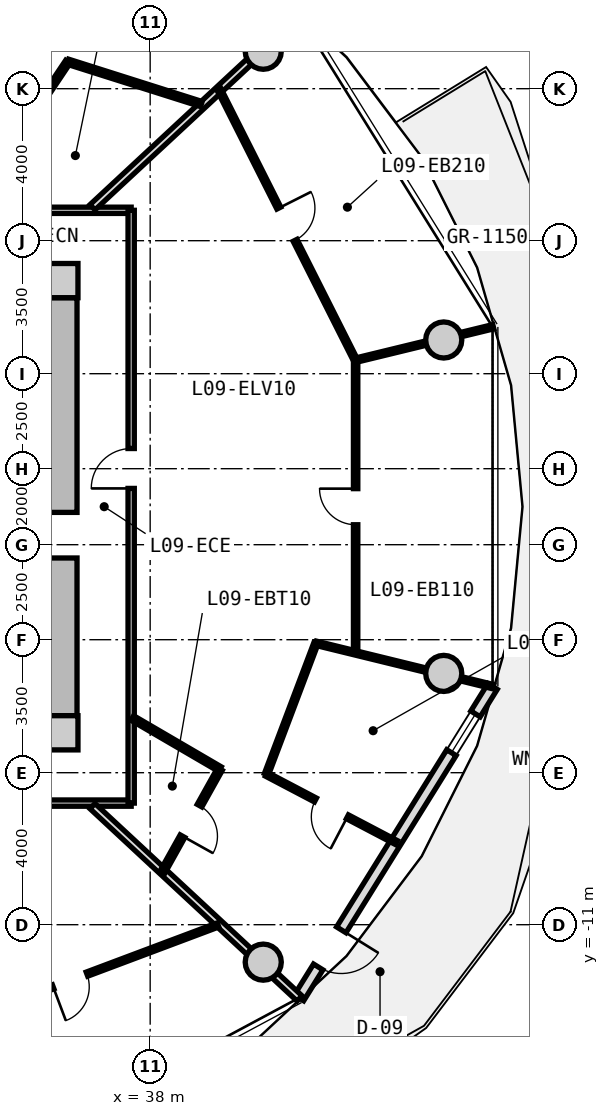
"""IFC4 building model, lengths in metres.
Left out: names, types, materials, properties, quantities, classifications, styles, units other than length and angle.
Written with IfcOpenShell. Run it as: python <this file> out.ifc"""

import sys

from ifc_helpers import new_model, si_unit, direction, frame, frame_2d, origin, origin_2d, place, context, subcontext, project, spatial, rectangle, circle, extrude, source, transform, mapped, element, fill, save


model = new_model("IFC4")
c1 = context("Model", 3, precision=1e-05, world=origin(), true_north=direction((0.0, 1.0)))
c2 = subcontext(c1, "Body", "Model", "MODEL_VIEW")
j1 = project(units=[si_unit("LENGTHUNIT", "METRE"), si_unit("PLANEANGLEUNIT", "RADIAN")], contexts=[c1])
p1 = place(None, origin())
s1 = spatial("IfcSite", under=j1, at=p1, CompositionType="ELEMENT")
p2 = place(p1, origin())
s2 = spatial("IfcBuilding", under=s1, at=p2, CompositionType="ELEMENT")
p3 = place(p2, frame((0.0, 0.0, 33.8)))
s3 = spatial("IfcBuildingStorey", under=s2, at=p3, CompositionType="ELEMENT", Elevation=33.8)
m1 = source(origin(), c2, "Body", "SweptSolid", [
    extrude(rectangle(XDim=0.9, YDim=0.9, at=origin_2d()), origin(), (0.0, 0.0, 1.0), 3.05),
])
for number, where, z_axis, x_axis in (
    (1, (35.65, -5.95, 0.0), (0.0, 0.0, 1.0), (1.0, 0.0, 0.0)),
    (2, (35.65, 5.95, 0.0), (0.0, 0.0, 1.0), (1.0, 0.0, 0.0)),
):
    element("IfcColumn", number, at=place(p3, frame(where, z_axis=z_axis, x_axis=x_axis)), inside=s3, PredefinedType="COLUMN", context=c2, shape_type="MappedRepresentation", body=[
        mapped(m1, transform((0.0, 0.0, 0.0), x_axis=(1.0, 0.0, 0.0), y_axis=(0.0, 1.0, 0.0), z_axis=(0.0, 0.0, 1.0), scale=1.0)),
    ])
m2 = source(origin(), c2, "Body", "SweptSolid", [
    extrude(rectangle(XDim=11.0, YDim=0.85, at=frame_2d((5.5, 0.0))), origin(), (0.0, 0.0, 1.0), 2.79),
])
p4 = place(p3, frame((35.65, 5.5, 0.0), z_axis=(0.0, 0.0, 1.0), x_axis=(0.0, -1.0, 0.0)))
e3 = element("IfcWall", 3, at=p4, inside=s3, PredefinedType="SHEAR", context=c2, shape_type="MappedRepresentation", body=[
    mapped(m2, transform((0.0, 0.0, 0.0), x_axis=(1.0, 0.0, 0.0), y_axis=(0.0, 1.0, 0.0), z_axis=(0.0, 0.0, 1.0), scale=1.0)),
])
p5 = place(p4, frame((5.65, 0.0, 0.0)))
e4 = element("IfcOpeningElement", 4, at=p5, cuts=e3, PredefinedType="OPENING", context=c2, shape_type="SweptSolid", body=[
    extrude(rectangle(XDim=1.2, YDim=2.15, at=frame_2d((0.6, 1.075))), frame((0.0, 0.435, 0.0), z_axis=(0.0, -1.0, 0.0), x_axis=(1.0, 0.0, 0.0)), (0.0, 0.0, 1.0), 0.87),
])
m3 = source(origin(), c2, "Body", "SweptSolid", [
    extrude(circle(Radius=0.475, at=origin_2d()), origin(), (0.0, 0.0, 1.0), 3.05),
])
for number, where, z_axis, x_axis in (
    (5, (45.725, 4.387, 0.0), (0.0, 0.0, 1.0), (1.0, 0.0, 0.0)),
    (6, (40.975, 11.985, 0.0), (0.0, 0.0, 1.0), (1.0, 0.0, 0.0)),
    (7, (40.975, -11.985, 0.0), (0.0, 0.0, 1.0), (1.0, 0.0, 0.0)),
    (8, (45.725, -4.387, 0.0), (0.0, 0.0, 1.0), (1.0, 0.0, 0.0)),
):
    element("IfcColumn", number, at=place(p3, frame(where, z_axis=z_axis, x_axis=x_axis)), inside=s3, PredefinedType="COLUMN", context=c2, shape_type="MappedRepresentation", body=[
        mapped(m3, transform((0.0, 0.0, 0.0), x_axis=(1.0, 0.0, 0.0), y_axis=(0.0, 1.0, 0.0), z_axis=(0.0, 0.0, 1.0), scale=1.0)),
    ])
m4 = source(origin(), c2, "Body", "SweptSolid", [
    extrude(rectangle(XDim=9.649, YDim=0.29, at=frame_2d((4.824, 0.0))), origin(), (0.0, 0.0, 1.0), 2.79),
])
p6 = place(p3, frame((47.01, -4.731, 0.0), z_axis=(0.0, 0.0, 1.0), x_axis=(-0.527909458386, -0.849300655684, 0.0)))
e9 = element("IfcWall", 9, at=p6, inside=s3, PredefinedType="SOLIDWALL", context=c2, shape_type="MappedRepresentation", body=[
    mapped(m4, transform((0.0, 0.0, 0.0), x_axis=(1.0, 0.0, 0.0), y_axis=(0.0, 1.0, 0.0), z_axis=(0.0, 0.0, 1.0), scale=1.0)),
])
p7 = place(p6, frame((7.54, 0.0, 0.0)))
e10 = element("IfcOpeningElement", 10, at=p7, cuts=e9, PredefinedType="OPENING", context=c2, shape_type="SweptSolid", body=[
    extrude(rectangle(XDim=1.15, YDim=2.25, at=frame_2d((0.575, 1.125))), frame((0.0, 0.155, 0.0), z_axis=(0.0, -1.0, 0.0), x_axis=(1.0, 0.0, 0.0)), (0.0, 0.0, 1.0), 0.31),
])
p8 = place(p6, frame((0.85, 0.0, 0.85)))
e11 = element("IfcOpeningElement", 11, at=p8, cuts=e9, PredefinedType="OPENING", context=c2, shape_type="SweptSolid", body=[
    extrude(rectangle(XDim=1.2, YDim=1.5, at=frame_2d((0.6, 0.75))), frame((0.0, 0.155, 0.0), z_axis=(0.0, -1.0, 0.0), x_axis=(1.0, 0.0, 0.0)), (0.0, 0.0, 1.0), 0.31),
])
m5 = source(origin(), c2, "Body", "SweptSolid", [
    extrude(rectangle(XDim=19.0, YDim=0.165, at=frame_2d((9.5, 0.0))), origin(), (0.0, 0.0, 1.0), 2.775),
])
p9 = place(p3, frame((18.5, 7.8, 0.0), z_axis=(0.0, 0.0, 1.0), x_axis=(1.0, 0.0, 0.0)))
e12 = element("IfcWall", 12, at=p9, inside=s3, PredefinedType="PARTITIONING", context=c2, shape_type="MappedRepresentation", body=[
    mapped(m5, transform((0.0, 0.0, 0.0), x_axis=(1.0, 0.0, 0.0), y_axis=(0.0, 1.0, 0.0), z_axis=(0.0, 0.0, 1.0), scale=1.0)),
])
p10 = place(p9, frame((10.523, 0.0, 0.0)))
e13 = element("IfcOpeningElement", 13, at=p10, cuts=e12, PredefinedType="OPENING", context=c2, shape_type="SweptSolid", body=[
    extrude(rectangle(XDim=0.92, YDim=2.1, at=frame_2d((0.46, 1.05))), frame((0.0, 0.093, 0.0), z_axis=(0.0, -1.0, 0.0), x_axis=(1.0, 0.0, 0.0)), (0.0, 0.0, 1.0), 0.185),
])
p11 = place(p9, frame((8.226, 0.0, 0.0)))
e14 = element("IfcOpeningElement", 14, at=p11, cuts=e12, PredefinedType="OPENING", context=c2, shape_type="SweptSolid", body=[
    extrude(rectangle(XDim=0.92, YDim=2.1, at=frame_2d((0.46, 1.05))), frame((0.0, 0.093, 0.0), z_axis=(0.0, -1.0, 0.0), x_axis=(1.0, 0.0, 0.0)), (0.0, 0.0, 1.0), 0.185),
])
p12 = place(p9, frame((3.506, 0.0, 0.0)))
e15 = element("IfcOpeningElement", 15, at=p12, cuts=e12, PredefinedType="OPENING", context=c2, shape_type="SweptSolid", body=[
    extrude(rectangle(XDim=1.25, YDim=2.2, at=frame_2d((0.625, 1.1))), frame((0.0, 0.093, 0.0), z_axis=(0.0, -1.0, 0.0), x_axis=(1.0, 0.0, 0.0)), (0.0, 0.0, 1.0), 0.185),
])
p13 = place(p9, frame((12.706, 0.0, 0.0)))
e16 = element("IfcOpeningElement", 16, at=p13, cuts=e12, PredefinedType="OPENING", context=c2, shape_type="SweptSolid", body=[
    extrude(rectangle(XDim=1.05, YDim=2.15, at=frame_2d((0.525, 1.075))), frame((0.0, 0.093, 0.0), z_axis=(0.0, -1.0, 0.0), x_axis=(1.0, 0.0, 0.0)), (0.0, 0.0, 1.0), 0.185),
])
p14 = place(p3, frame((37.5, -7.8, 0.0), z_axis=(0.0, 0.0, 1.0), x_axis=(-1.0, 0.0, 0.0)))
e17 = element("IfcWall", 17, at=p14, inside=s3, PredefinedType="PARTITIONING", context=c2, shape_type="MappedRepresentation", body=[
    mapped(m5, transform((0.0, 0.0, 0.0), x_axis=(1.0, 0.0, 0.0), y_axis=(0.0, 1.0, 0.0), z_axis=(0.0, 0.0, 1.0), scale=1.0)),
])
p15 = place(p14, frame((7.336, 0.0, 0.0)))
e18 = element("IfcOpeningElement", 18, at=p15, cuts=e17, PredefinedType="OPENING", context=c2, shape_type="SweptSolid", body=[
    extrude(rectangle(XDim=1.05, YDim=2.15, at=frame_2d((0.525, 1.075))), frame((0.0, 0.093, 0.0), z_axis=(0.0, -1.0, 0.0), x_axis=(1.0, 0.0, 0.0)), (0.0, 0.0, 1.0), 0.185),
])
m6 = source(origin(), c2, "Body", "SweptSolid", [
    extrude(rectangle(XDim=15.6, YDim=0.165, at=frame_2d((7.8, 0.0))), origin(), (0.0, 0.0, 1.0), 2.775),
])
p16 = place(p3, frame((37.5, 7.8, 0.0), z_axis=(0.0, 0.0, 1.0), x_axis=(0.0, -1.0, 0.0)))
e19 = element("IfcWall", 19, at=p16, inside=s3, PredefinedType="PARTITIONING", context=c2, shape_type="MappedRepresentation", body=[
    mapped(m6, transform((0.0, 0.0, 0.0), x_axis=(1.0, 0.0, 0.0), y_axis=(0.0, 1.0, 0.0), z_axis=(0.0, 0.0, 1.0), scale=1.0)),
])
p17 = place(p16, frame((6.269, 0.0, 0.0)))
e20 = element("IfcOpeningElement", 20, at=p17, cuts=e19, PredefinedType="OPENING", context=c2, shape_type="SweptSolid", body=[
    extrude(rectangle(XDim=1.05, YDim=2.15, at=frame_2d((0.525, 1.075))), frame((0.0, 0.093, 0.0), z_axis=(0.0, -1.0, 0.0), x_axis=(1.0, 0.0, 0.0)), (0.0, 0.0, 1.0), 0.185),
])
m7 = source(origin(), c2, "Body", "SweptSolid", [
    extrude(rectangle(XDim=7.435, YDim=0.19, at=frame_2d((3.717, 0.0))), origin(), (0.0, 0.0, 1.0), 2.225),
])
p18 = place(p3, frame((36.483, -7.88, 0.0), z_axis=(0.0, 0.0, 1.0), x_axis=(0.732651956848, -0.680603489652, 0.0)))
e21 = element("IfcWall", 21, at=p18, inside=s3, PredefinedType="PARTITIONING", context=c2, shape_type="MappedRepresentation", body=[
    mapped(m7, transform((0.0, 0.0, 0.0), x_axis=(1.0, 0.0, 0.0), y_axis=(0.0, 1.0, 0.0), z_axis=(0.0, 0.0, 1.0), scale=1.0)),
])
m8 = source(origin(), c2, "Body", "SweptSolid", [
    extrude(rectangle(XDim=8.32, YDim=0.115, at=frame_2d((4.16, 0.0))), origin(), (0.0, 0.0, 1.0), 2.775),
])
p19 = place(p3, frame((31.997, -13.93, 0.0), z_axis=(0.0, 0.0, 1.0), x_axis=(0.936180763098, 0.351518959382, 0.0)))
e22 = element("IfcWall", 22, at=p19, inside=s3, PredefinedType="PARTITIONING", context=c2, shape_type="MappedRepresentation", body=[
    mapped(m8, transform((0.0, 0.0, 0.0), x_axis=(1.0, 0.0, 0.0), y_axis=(0.0, 1.0, 0.0), z_axis=(0.0, 0.0, 1.0), scale=1.0)),
])
p20 = place(p19, frame((3.685, 0.0, 0.0)))
e23 = element("IfcOpeningElement", 23, at=p20, cuts=e22, PredefinedType="OPENING", context=c2, shape_type="SweptSolid", body=[
    extrude(rectangle(XDim=0.95, YDim=2.1, at=frame_2d((0.475, 1.05))), frame((0.0, 0.067, 0.0), z_axis=(0.0, -1.0, 0.0), x_axis=(1.0, 0.0, 0.0)), (0.0, 0.0, 1.0), 0.135),
])
p21 = place(p3, frame((36.483, 7.88, 0.0), z_axis=(0.0, 0.0, 1.0), x_axis=(0.732651956848, 0.680603489652, 0.0)))
e24 = element("IfcWall", 24, at=p21, inside=s3, PredefinedType="PARTITIONING", context=c2, shape_type="MappedRepresentation", body=[
    mapped(m7, transform((0.0, 0.0, 0.0), x_axis=(1.0, 0.0, 0.0), y_axis=(0.0, 1.0, 0.0), z_axis=(0.0, 0.0, 1.0), scale=1.0)),
])
m9 = source(origin(), c2, "Body", "SweptSolid", [
    extrude(rectangle(XDim=7.709, YDim=0.115, at=frame_2d((3.855, 0.0))), origin(), (0.0, 0.0, 1.0), 2.775),
])
p22 = place(p3, frame((43.406, -3.855, 0.0), z_axis=(0.0, 0.0, 1.0), x_axis=(0.0, 1.0, 0.0)))
e25 = element("IfcWall", 25, at=p22, inside=s3, PredefinedType="PARTITIONING", context=c2, shape_type="MappedRepresentation", body=[
    mapped(m9, transform((0.0, 0.0, 0.0), x_axis=(1.0, 0.0, 0.0), y_axis=(0.0, 1.0, 0.0), z_axis=(0.0, 0.0, 1.0), scale=1.0)),
])
p23 = place(p22, frame((3.38, 0.0, 0.0)))
e26 = element("IfcOpeningElement", 26, at=p23, cuts=e25, PredefinedType="OPENING", context=c2, shape_type="SweptSolid", body=[
    extrude(rectangle(XDim=0.95, YDim=2.1, at=frame_2d((0.475, 1.05))), frame((0.0, 0.067, 0.0), z_axis=(0.0, -1.0, 0.0), x_axis=(1.0, 0.0, 0.0)), (0.0, 0.0, 1.0), 0.135),
])
m10 = source(origin(), c2, "Body", "SweptSolid", [
    extrude(rectangle(XDim=4.803, YDim=0.115, at=frame_2d((2.401, 0.0))), origin(), (0.0, 0.0, 1.0), 2.225),
])
p24 = place(p3, frame((42.364, -3.594, 0.0), z_axis=(0.0, 0.0, 1.0), x_axis=(0.97129155908, -0.237892217736, 0.0)))
e27 = element("IfcWall", 27, at=p24, inside=s3, PredefinedType="PARTITIONING", context=c2, shape_type="MappedRepresentation", body=[
    mapped(m10, transform((0.0, 0.0, 0.0), x_axis=(1.0, 0.0, 0.0), y_axis=(0.0, 1.0, 0.0), z_axis=(0.0, 0.0, 1.0), scale=1.0)),
])
m11 = source(origin(), c2, "Body", "SweptSolid", [
    extrude(rectangle(XDim=8.018, YDim=0.115, at=frame_2d((4.009, 0.0))), origin(), (0.0, 0.0, 1.0), 2.775),
])
p25 = place(p3, frame((43.404, 3.854, 0.0), z_axis=(0.0, 0.0, 1.0), x_axis=(-0.450134355233, 0.89296084026, 0.0)))
e28 = element("IfcWall", 28, at=p25, inside=s3, PredefinedType="PARTITIONING", context=c2, shape_type="MappedRepresentation", body=[
    mapped(m11, transform((0.0, 0.0, 0.0), x_axis=(1.0, 0.0, 0.0), y_axis=(0.0, 1.0, 0.0), z_axis=(0.0, 0.0, 1.0), scale=1.0)),
])
p26 = place(p25, frame((3.534, 0.0, 0.0)))
e29 = element("IfcOpeningElement", 29, at=p26, cuts=e28, PredefinedType="OPENING", context=c2, shape_type="SweptSolid", body=[
    extrude(rectangle(XDim=0.95, YDim=2.1, at=frame_2d((0.475, 1.05))), frame((0.0, 0.067, 0.0), z_axis=(0.0, -1.0, 0.0), x_axis=(1.0, 0.0, 0.0)), (0.0, 0.0, 1.0), 0.135),
])
m12 = source(origin(), c2, "Body", "SweptSolid", [
    extrude(rectangle(XDim=3.73, YDim=0.115, at=frame_2d((1.865, 0.0))), origin(), (0.0, 0.0, 1.0), 2.225),
])
p27 = place(p3, frame((43.404, 3.854, 0.0), z_axis=(0.0, 0.0, 1.0), x_axis=(0.971644038568, 0.236448434791, 0.0)))
e30 = element("IfcWall", 30, at=p27, inside=s3, PredefinedType="PARTITIONING", context=c2, shape_type="MappedRepresentation", body=[
    mapped(m12, transform((0.0, 0.0, 0.0), x_axis=(1.0, 0.0, 0.0), y_axis=(0.0, 1.0, 0.0), z_axis=(0.0, 0.0, 1.0), scale=1.0)),
])
m13 = source(origin(), c2, "Body", "SweptSolid", [
    extrude(rectangle(XDim=2.669, YDim=0.14, at=frame_2d((1.335, 0.0))), origin(), (0.0, 0.0, 1.0), 2.775),
])
p28 = place(p3, frame((37.53, -5.561, 0.0), z_axis=(0.0, 0.0, 1.0), x_axis=(0.86369928178, -0.50400749067, 0.0)))
e31 = element("IfcWall", 31, at=p28, inside=s3, PredefinedType="PARTITIONING", context=c2, shape_type="MappedRepresentation", body=[
    mapped(m13, transform((0.0, 0.0, 0.0), x_axis=(1.0, 0.0, 0.0), y_axis=(0.0, 1.0, 0.0), z_axis=(0.0, 0.0, 1.0), scale=1.0)),
])
m14 = source(origin(), c2, "Body", "SweptSolid", [
    extrude(rectangle(XDim=3.121, YDim=0.14, at=frame_2d((1.561, 0.0))), origin(), (0.0, 0.0, 1.0), 2.775),
])
p29 = place(p3, frame((39.836, -6.906, 0.0), z_axis=(0.0, 0.0, 1.0), x_axis=(-0.487302357327, -0.873233309342, 0.0)))
e32 = element("IfcWall", 32, at=p29, inside=s3, PredefinedType="PARTITIONING", context=c2, shape_type="MappedRepresentation", body=[
    mapped(m14, transform((0.0, 0.0, 0.0), x_axis=(1.0, 0.0, 0.0), y_axis=(0.0, 1.0, 0.0), z_axis=(0.0, 0.0, 1.0), scale=1.0)),
])
p30 = place(p29, frame((1.101, 0.0, 0.0)))
e33 = element("IfcOpeningElement", 33, at=p30, cuts=e32, PredefinedType="OPENING", context=c2, shape_type="SweptSolid", body=[
    extrude(rectangle(XDim=0.92, YDim=2.1, at=frame_2d((0.46, 1.05))), frame((0.0, 0.08, 0.0), z_axis=(0.0, -1.0, 0.0), x_axis=(1.0, 0.0, 0.0)), (0.0, 0.0, 1.0), 0.16),
])
m15 = source(origin(), c2, "Body", "SweptSolid", [
    extrude(rectangle(XDim=3.864, YDim=0.115, at=frame_2d((1.932, 0.0))), origin(), (0.0, 0.0, 1.0), 2.775),
])
p31 = place(p3, frame((41.06, -7.041, 0.0), z_axis=(0.0, 0.0, 1.0), x_axis=(0.885194959803, -0.465220252289, 0.0)))
e34 = element("IfcWall", 34, at=p31, inside=s3, PredefinedType="PARTITIONING", context=c2, shape_type="MappedRepresentation", body=[
    mapped(m15, transform((0.0, 0.0, 0.0), x_axis=(1.0, 0.0, 0.0), y_axis=(0.0, 1.0, 0.0), z_axis=(0.0, 0.0, 1.0), scale=1.0)),
])
p32 = place(p31, frame((1.457, 0.0, 0.0)))
e35 = element("IfcOpeningElement", 35, at=p32, cuts=e34, PredefinedType="OPENING", context=c2, shape_type="SweptSolid", body=[
    extrude(rectangle(XDim=0.95, YDim=2.1, at=frame_2d((0.475, 1.05))), frame((0.0, 0.067, 0.0), z_axis=(0.0, -1.0, 0.0), x_axis=(1.0, 0.0, 0.0)), (0.0, 0.0, 1.0), 0.135),
])
m16 = source(origin(), c2, "Body", "SweptSolid", [
    extrude(rectangle(XDim=3.685, YDim=0.115, at=frame_2d((1.843, 0.0))), origin(), (0.0, 0.0, 1.0), 2.775),
])
p33 = place(p3, frame((41.06, -7.041, 0.0), z_axis=(0.0, 0.0, 1.0), x_axis=(0.353503632997, 0.935433151785, 0.0)))
e36 = element("IfcWall", 36, at=p33, inside=s3, PredefinedType="PARTITIONING", context=c2, shape_type="MappedRepresentation", body=[
    mapped(m16, transform((0.0, 0.0, 0.0), x_axis=(1.0, 0.0, 0.0), y_axis=(0.0, 1.0, 0.0), z_axis=(0.0, 0.0, 1.0), scale=1.0)),
])
m17 = source(origin(), c2, "Body", "SweptSolid", [
    extrude(rectangle(XDim=4.668, YDim=0.14, at=frame_2d((2.334, 0.0))), origin(), (0.0, 0.0, 1.0), 2.775),
])
p34 = place(p3, frame((33.24, 7.83, 0.0), z_axis=(0.0, 0.0, 1.0), x_axis=(0.55615986029, 0.83107533341, 0.0)))
e37 = element("IfcWall", 37, at=p34, inside=s3, PredefinedType="PARTITIONING", context=c2, shape_type="MappedRepresentation", body=[
    mapped(m17, transform((0.0, 0.0, 0.0), x_axis=(1.0, 0.0, 0.0), y_axis=(0.0, 1.0, 0.0), z_axis=(0.0, 0.0, 1.0), scale=1.0)),
])
p35 = place(p34, frame((1.874, 0.0, 0.0)))
e38 = element("IfcOpeningElement", 38, at=p35, cuts=e37, PredefinedType="OPENING", context=c2, shape_type="SweptSolid", body=[
    extrude(rectangle(XDim=0.92, YDim=2.1, at=frame_2d((0.46, 1.05))), frame((0.0, 0.08, 0.0), z_axis=(0.0, -1.0, 0.0), x_axis=(1.0, 0.0, 0.0)), (0.0, 0.0, 1.0), 0.16),
])
m18 = source(origin(), c2, "Body", "SweptSolid", [
    extrude(rectangle(XDim=3.684, YDim=0.14, at=frame_2d((1.842, 0.0))), origin(), (0.0, 0.0, 1.0), 2.775),
])
p36 = place(p3, frame((35.836, 11.709, 0.0), z_axis=(0.0, 0.0, 1.0), x_axis=(0.953245538614, -0.302196861518, 0.0)))
e39 = element("IfcWall", 39, at=p36, inside=s3, PredefinedType="PARTITIONING", context=c2, shape_type="MappedRepresentation", body=[
    mapped(m18, transform((0.0, 0.0, 0.0), x_axis=(1.0, 0.0, 0.0), y_axis=(0.0, 1.0, 0.0), z_axis=(0.0, 0.0, 1.0), scale=1.0)),
])
m19 = source(origin(), c2, "Body", "SweptSolid", [
    extrude(rectangle(XDim=1.15, YDim=2.25, at=frame_2d((0.575, 1.125))), frame((0.0, 0.025, 0.0), z_axis=(0.0, -1.0, 0.0), x_axis=(1.0, 0.0, 0.0)), (0.0, 0.0, 1.0), 0.05),
])
p37 = place(p7, origin())
e40 = element("IfcDoor", 40, at=p37, inside=s3, OperationType="SINGLE_SWING_LEFT", PredefinedType="DOOR", context=c2, shape_type="MappedRepresentation", body=[
    mapped(m19, transform((0.0, 0.0, 0.0), x_axis=(1.0, 0.0, 0.0), y_axis=(0.0, 1.0, 0.0), z_axis=(0.0, 0.0, 1.0), scale=1.0)),
])
fill(e10, e40)
m20 = source(origin(), c2, "Body", "SweptSolid", [
    extrude(rectangle(XDim=1.2, YDim=1.5, at=frame_2d((0.6, 0.75))), frame((0.0, 0.03, 0.0), z_axis=(0.0, -1.0, 0.0), x_axis=(1.0, 0.0, 0.0)), (0.0, 0.0, 1.0), 0.06),
])
p38 = place(p8, origin())
e41 = element("IfcWindow", 41, at=p38, inside=s3, PartitioningType="SINGLE_PANEL", PredefinedType="WINDOW", context=c2, shape_type="MappedRepresentation", body=[
    mapped(m20, transform((0.0, 0.0, 0.0), x_axis=(1.0, 0.0, 0.0), y_axis=(0.0, 1.0, 0.0), z_axis=(0.0, 0.0, 1.0), scale=1.0)),
])
fill(e11, e41)
m21 = source(origin(), c2, "Body", "SweptSolid", [
    extrude(rectangle(XDim=1.2, YDim=2.15, at=frame_2d((0.6, 1.075))), frame((0.0, 0.025, 0.0), z_axis=(0.0, -1.0, 0.0), x_axis=(1.0, 0.0, 0.0)), (0.0, 0.0, 1.0), 0.05),
])
p39 = place(p5, frame((1.2, 0.0, 0.0), z_axis=(0.0, 0.0, 1.0), x_axis=(-1.0, 0.0, 0.0)))
e42 = element("IfcDoor", 42, at=p39, inside=s3, OperationType="SINGLE_SWING_RIGHT", PredefinedType="DOOR", context=c2, shape_type="MappedRepresentation", body=[
    mapped(m21, transform((0.0, 0.0, 0.0), x_axis=(1.0, 0.0, 0.0), y_axis=(0.0, 1.0, 0.0), z_axis=(0.0, 0.0, 1.0), scale=1.0)),
])
fill(e4, e42)
m22 = source(origin(), c2, "Body", "SweptSolid", [
    extrude(rectangle(XDim=0.95, YDim=2.1, at=frame_2d((0.475, 1.05))), frame((0.0, 0.025, 0.0), z_axis=(0.0, -1.0, 0.0), x_axis=(1.0, 0.0, 0.0)), (0.0, 0.0, 1.0), 0.05),
])
p40 = place(p20, frame((0.95, 0.0, 0.0), z_axis=(0.0, 0.0, 1.0), x_axis=(-1.0, 0.0, 0.0)))
e43 = element("IfcDoor", 43, at=p40, inside=s3, OperationType="SINGLE_SWING_RIGHT", PredefinedType="DOOR", context=c2, shape_type="MappedRepresentation", body=[
    mapped(m22, transform((0.0, 0.0, 0.0), x_axis=(1.0, 0.0, 0.0), y_axis=(0.0, 1.0, 0.0), z_axis=(0.0, 0.0, 1.0), scale=1.0)),
])
fill(e23, e43)
m23 = source(origin(), c2, "Body", "SweptSolid", [
    extrude(rectangle(XDim=1.05, YDim=2.15, at=frame_2d((0.525, 1.075))), frame((0.0, 0.025, 0.0), z_axis=(0.0, -1.0, 0.0), x_axis=(1.0, 0.0, 0.0)), (0.0, 0.0, 1.0), 0.05),
])
p41 = place(p17, frame((1.05, 0.0, 0.0), z_axis=(0.0, 0.0, 1.0), x_axis=(-1.0, 0.0, 0.0)))
e44 = element("IfcDoor", 44, at=p41, inside=s3, OperationType="SINGLE_SWING_LEFT", PredefinedType="DOOR", context=c2, shape_type="MappedRepresentation", body=[
    mapped(m23, transform((0.0, 0.0, 0.0), x_axis=(1.0, 0.0, 0.0), y_axis=(0.0, 1.0, 0.0), z_axis=(0.0, 0.0, 1.0), scale=1.0)),
])
fill(e20, e44)
m24 = source(origin(), c2, "Body", "SweptSolid", [
    extrude(rectangle(XDim=0.92, YDim=2.1, at=frame_2d((0.46, 1.05))), frame((0.0, 0.025, 0.0), z_axis=(0.0, -1.0, 0.0), x_axis=(1.0, 0.0, 0.0)), (0.0, 0.0, 1.0), 0.05),
])
p42 = place(p30, origin())
e45 = element("IfcDoor", 45, at=p42, inside=s3, OperationType="SINGLE_SWING_RIGHT", PredefinedType="DOOR", context=c2, shape_type="MappedRepresentation", body=[
    mapped(m24, transform((0.0, 0.0, 0.0), x_axis=(1.0, 0.0, 0.0), y_axis=(0.0, 1.0, 0.0), z_axis=(0.0, 0.0, 1.0), scale=1.0)),
])
fill(e33, e45)
p43 = place(p32, frame((0.95, 0.0, 0.0), z_axis=(0.0, 0.0, 1.0), x_axis=(-1.0, 0.0, 0.0)))
e46 = element("IfcDoor", 46, at=p43, inside=s3, OperationType="SINGLE_SWING_LEFT", PredefinedType="DOOR", context=c2, shape_type="MappedRepresentation", body=[
    mapped(m22, transform((0.0, 0.0, 0.0), x_axis=(1.0, 0.0, 0.0), y_axis=(0.0, 1.0, 0.0), z_axis=(0.0, 0.0, 1.0), scale=1.0)),
])
fill(e35, e46)
p44 = place(p23, origin())
e47 = element("IfcDoor", 47, at=p44, inside=s3, OperationType="SINGLE_SWING_RIGHT", PredefinedType="DOOR", context=c2, shape_type="MappedRepresentation", body=[
    mapped(m22, transform((0.0, 0.0, 0.0), x_axis=(1.0, 0.0, 0.0), y_axis=(0.0, 1.0, 0.0), z_axis=(0.0, 0.0, 1.0), scale=1.0)),
])
fill(e26, e47)
p45 = place(p26, frame((0.95, 0.0, 0.0), z_axis=(0.0, 0.0, 1.0), x_axis=(-1.0, 0.0, 0.0)))
e48 = element("IfcDoor", 48, at=p45, inside=s3, OperationType="SINGLE_SWING_LEFT", PredefinedType="DOOR", context=c2, shape_type="MappedRepresentation", body=[
    mapped(m22, transform((0.0, 0.0, 0.0), x_axis=(1.0, 0.0, 0.0), y_axis=(0.0, 1.0, 0.0), z_axis=(0.0, 0.0, 1.0), scale=1.0)),
])
fill(e29, e48)
save(model, sys.argv[1])
